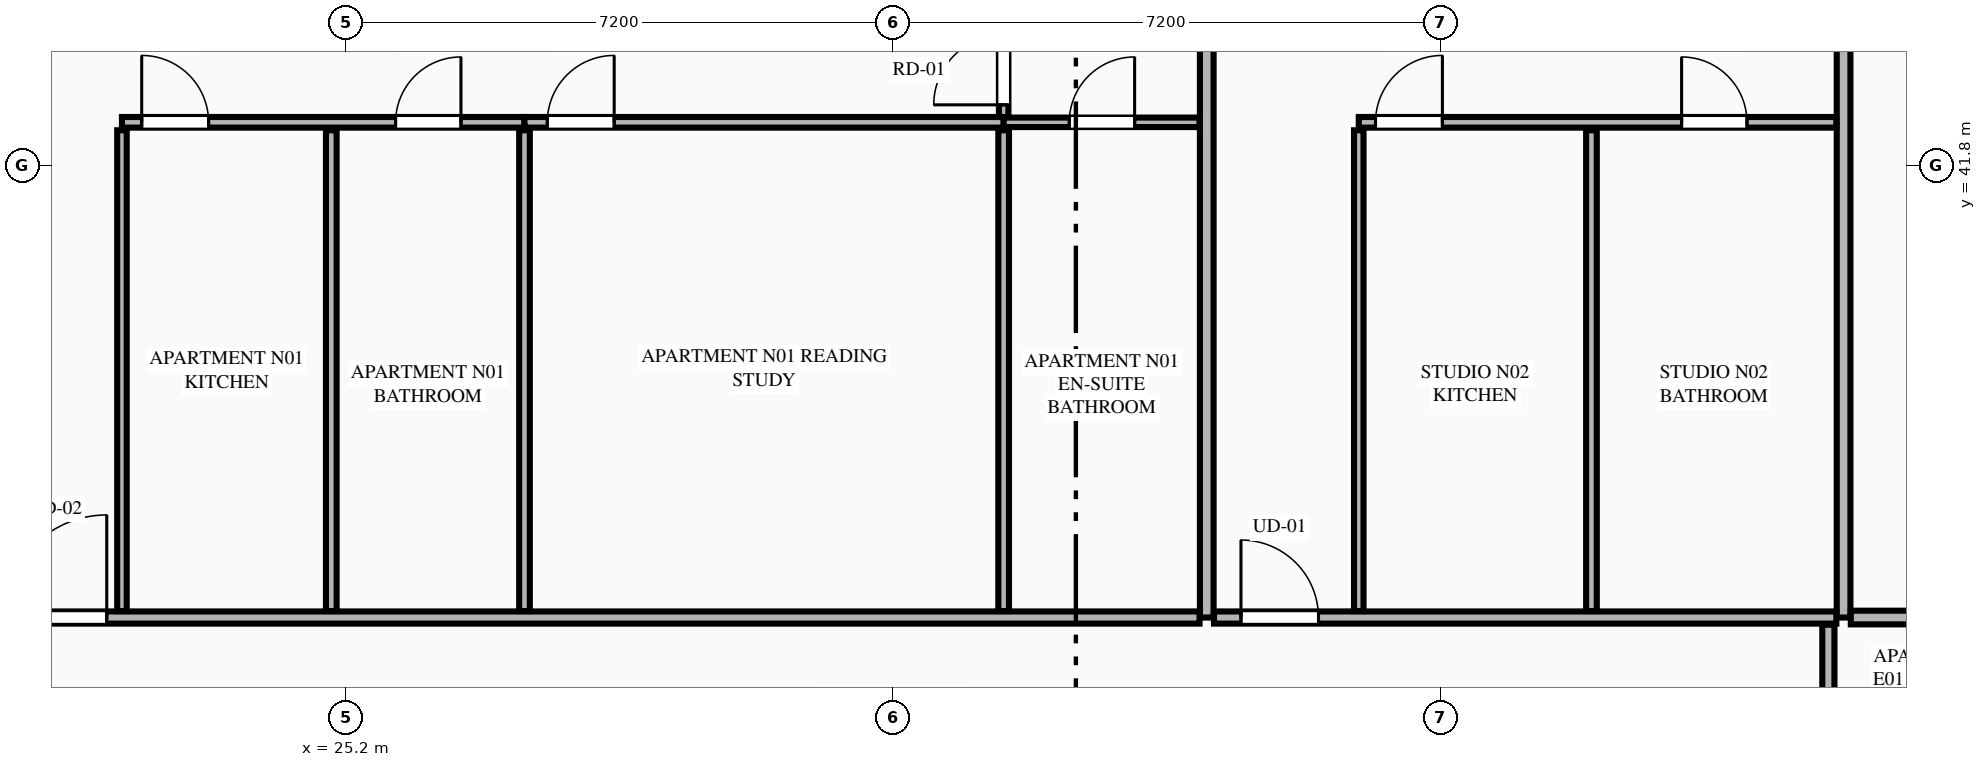
"""IFC4 building model, lengths in metres.
Left out: names, types, materials, properties, quantities, classifications, styles, units other than length and angle.
Written with IfcOpenShell. Run it as: python <this file> out.ifc"""

import sys

from ifc_helpers import new_model, si_unit, direction, frame, frame_2d, origin, place, context, subcontext, project, spatial, rectangle, extrude, element, fill, save


model = new_model("IFC4")
c1 = context("Model", 3, precision=1e-05, world=origin(), true_north=direction((0.0, 1.0)))
c2 = subcontext(c1, "Body", "Model", "MODEL_VIEW")
j1 = project(units=[si_unit("LENGTHUNIT", "METRE"), si_unit("PLANEANGLEUNIT", "RADIAN")], contexts=[c1])
p1 = place(None, origin())
s1 = spatial("IfcSite", under=j1, at=p1, CompositionType="ELEMENT")
p2 = place(p1, origin())
s2 = spatial("IfcBuilding", under=s1, at=p2, CompositionType="ELEMENT")
p3 = place(p2, frame((0.0, 0.0, 53.3)))
s3 = spatial("IfcBuildingStorey", under=s2, at=p3, CompositionType="ELEMENT", Elevation=53.3)
p4 = place(p3, frame((36.522, 35.85, 0.0), z_axis=(0.0, 0.0, 1.0), x_axis=(0.0, 1.0, 0.0)))
e1 = element("IfcWall", 1, at=p4, inside=s3, PredefinedType="PARTITIONING", context=c2, shape_type="SweptSolid", body=[
    extrude(rectangle(XDim=13.295, YDim=0.18, at=frame_2d((6.647, 0.0))), origin(), (0.0, 0.0, 1.0), 2.637),
])
p5 = place(p3, frame((44.9, 35.85, 0.0), z_axis=(0.0, 0.0, 1.0), x_axis=(0.0, 1.0, 0.0)))
e2 = element("IfcWall", 2, at=p5, inside=s3, PredefinedType="PARTITIONING", context=c2, shape_type="SweptSolid", body=[
    extrude(rectangle(XDim=13.295, YDim=0.18, at=frame_2d((6.647, 0.0))), origin(), (0.0, 0.0, 1.0), 3.33),
])
p6 = place(p3, frame((19.995, 35.85, 0.0), z_axis=(0.0, 0.0, 1.0), x_axis=(1.0, 0.0, 0.0)))
e3 = element("IfcWall", 3, at=p6, inside=s3, PredefinedType="PARTITIONING", context=c2, shape_type="SweptSolid", body=[
    extrude(rectangle(XDim=16.432, YDim=0.16, at=frame_2d((8.216, 0.0))), origin(), (0.0, 0.0, 1.0), 3.33),
])
p7 = place(p6, frame((0.705, 0.0, 0.0)))
e4 = element("IfcOpeningElement", 4, at=p7, cuts=e3, PredefinedType="OPENING", context=c2, shape_type="SweptSolid", body=[
    extrude(rectangle(XDim=1.35, YDim=2.35, at=frame_2d((0.675, 1.175))), frame((0.0, 0.09, 0.0), z_axis=(0.0, -1.0, 0.0), x_axis=(1.0, 0.0, 0.0)), (0.0, 0.0, 1.0), 0.18),
])
p8 = place(p3, frame((22.25, 35.935, 0.0), z_axis=(0.0, 0.0, 1.0), x_axis=(0.0, 1.0, 0.0)))
e5 = element("IfcWall", 5, at=p8, inside=s3, PredefinedType="PARTITIONING", context=c2, shape_type="SweptSolid", body=[
    extrude(rectangle(XDim=6.325, YDim=0.125, at=frame_2d((3.163, 0.0))), origin(), (0.0, 0.0, 1.0), 2.637),
])
p9 = place(p3, frame((22.25, 42.365, 0.0), z_axis=(0.0, 0.0, 1.0), x_axis=(1.0, 0.0, 0.0)))
e6 = element("IfcWall", 6, at=p9, inside=s3, PredefinedType="PLUMBINGWALL", context=c2, shape_type="SweptSolid", body=[
    extrude(rectangle(XDim=5.296, YDim=0.14, at=frame_2d((2.648, 0.0))), origin(), (0.0, 0.0, 1.0), 3.33),
])
p10 = place(p9, frame((3.6, 0.0, 0.0)))
e7 = element("IfcOpeningElement", 7, at=p10, cuts=e6, PredefinedType="OPENING", context=c2, shape_type="SweptSolid", body=[
    extrude(rectangle(XDim=0.86, YDim=2.1, at=frame_2d((0.43, 1.05))), frame((0.0, 0.08, 0.0), z_axis=(0.0, -1.0, 0.0), x_axis=(1.0, 0.0, 0.0)), (0.0, 0.0, 1.0), 0.16),
])
p11 = place(p9, frame((0.26, 0.0, 0.0)))
e8 = element("IfcOpeningElement", 8, at=p11, cuts=e6, PredefinedType="OPENING", context=c2, shape_type="SweptSolid", body=[
    extrude(rectangle(XDim=0.88, YDim=2.15, at=frame_2d((0.44, 1.075))), frame((0.0, 0.08, 0.0), z_axis=(0.0, -1.0, 0.0), x_axis=(1.0, 0.0, 0.0)), (0.0, 0.0, 1.0), 0.16),
])
p12 = place(p3, frame((27.546, 42.365, 0.0), z_axis=(0.0, 0.0, 1.0), x_axis=(1.0, 0.0, 0.0)))
e9 = element("IfcWall", 9, at=p12, inside=s3, PredefinedType="PLUMBINGWALL", context=c2, shape_type="SweptSolid", body=[
    extrude(rectangle(XDim=6.304, YDim=0.14, at=frame_2d((3.152, 0.0))), origin(), (0.0, 0.0, 1.0), 3.33),
])
p13 = place(p12, frame((0.3, 0.0, 0.0)))
e10 = element("IfcOpeningElement", 10, at=p13, cuts=e9, PredefinedType="OPENING", context=c2, shape_type="SweptSolid", body=[
    extrude(rectangle(XDim=0.88, YDim=2.15, at=frame_2d((0.44, 1.075))), frame((0.0, 0.08, 0.0), z_axis=(0.0, -1.0, 0.0), x_axis=(1.0, 0.0, 0.0)), (0.0, 0.0, 1.0), 0.16),
])
p14 = place(p3, frame((33.85, 42.365, 0.0), z_axis=(0.0, 0.0, 1.0), x_axis=(1.0, 0.0, 0.0)))
e11 = element("IfcWall", 11, at=p14, inside=s3, PredefinedType="PARTITIONING", context=c2, shape_type="SweptSolid", body=[
    extrude(rectangle(XDim=2.577, YDim=0.125, at=frame_2d((1.289, 0.0))), origin(), (0.0, 0.0, 1.0), 3.33),
])
p15 = place(p14, frame((0.863, 0.0, 0.0)))
e12 = element("IfcOpeningElement", 12, at=p15, cuts=e11, PredefinedType="OPENING", context=c2, shape_type="SweptSolid", body=[
    extrude(rectangle(XDim=0.86, YDim=2.1, at=frame_2d((0.43, 1.05))), frame((0.0, 0.073, 0.0), z_axis=(0.0, -1.0, 0.0), x_axis=(1.0, 0.0, 0.0)), (0.0, 0.0, 1.0), 0.145),
])
p16 = place(p3, frame((25.004, 35.935, 0.0), z_axis=(0.0, 0.0, 1.0), x_axis=(0.0, 1.0, 0.0)))
e13 = element("IfcWall", 13, at=p16, inside=s3, PredefinedType="PLUMBINGWALL", context=c2, shape_type="SweptSolid", body=[
    extrude(rectangle(XDim=6.325, YDim=0.14, at=frame_2d((3.163, 0.0))), origin(), (0.0, 0.0, 1.0), 3.33),
])
p17 = place(p3, frame((33.85, 42.435, 0.0), z_axis=(0.0, 0.0, 1.0), x_axis=(0.0, 1.0, 0.0)))
e14 = element("IfcWall", 14, at=p17, inside=s3, PredefinedType="PARTITIONING", context=c2, shape_type="SweptSolid", body=[
    extrude(rectangle(XDim=1.33, YDim=0.125, at=frame_2d((0.665, 0.0))), origin(), (0.0, 0.0, 1.0), 3.33),
])
p18 = place(p17, frame((0.16, 0.0, 0.0)))
e15 = element("IfcOpeningElement", 15, at=p18, cuts=e14, PredefinedType="OPENING", context=c2, shape_type="SweptSolid", body=[
    extrude(rectangle(XDim=0.92, YDim=2.15, at=frame_2d((0.46, 1.075))), frame((0.0, 0.073, 0.0), z_axis=(0.0, -1.0, 0.0), x_axis=(1.0, 0.0, 0.0)), (0.0, 0.0, 1.0), 0.145),
])
for number, where, z_axis, x_axis in (
    (16, (27.546, 35.935, 0.0), (0.0, 0.0, 1.0), (0.0, 1.0, 0.0)),
    (17, (33.85, 35.935, 0.0), (0.0, 0.0, 1.0), (0.0, 1.0, 0.0)),
):
    element("IfcWall", number, at=place(p3, frame(where, z_axis=z_axis, x_axis=x_axis)), inside=s3, PredefinedType="PLUMBINGWALL", context=c2, shape_type="SweptSolid", body=[
        extrude(rectangle(XDim=6.325, YDim=0.14, at=frame_2d((3.163, 0.0))), origin(), (0.0, 0.0, 1.0), 3.33),
    ])
p19 = place(p3, frame((36.617, 35.85, 0.0), z_axis=(0.0, 0.0, 1.0), x_axis=(1.0, 0.0, 0.0)))
e18 = element("IfcWall", 18, at=p19, inside=s3, PredefinedType="PARTITIONING", context=c2, shape_type="SweptSolid", body=[
    extrude(rectangle(XDim=8.188, YDim=0.16, at=frame_2d((4.094, 0.0))), origin(), (0.0, 0.0, 1.0), 3.33),
])
p20 = place(p19, frame((0.355, 0.0, 0.0)))
e19 = element("IfcOpeningElement", 19, at=p20, cuts=e18, PredefinedType="OPENING", context=c2, shape_type="SweptSolid", body=[
    extrude(rectangle(XDim=1.02, YDim=2.25, at=frame_2d((0.51, 1.125))), frame((0.0, 0.09, 0.0), z_axis=(0.0, -1.0, 0.0), x_axis=(1.0, 0.0, 0.0)), (0.0, 0.0, 1.0), 0.18),
])
p21 = place(p3, frame((38.522, 35.935, 0.0), z_axis=(0.0, 0.0, 1.0), x_axis=(0.0, 1.0, 0.0)))
e20 = element("IfcWall", 20, at=p21, inside=s3, PredefinedType="PARTITIONING", context=c2, shape_type="SweptSolid", body=[
    extrude(rectangle(XDim=6.325, YDim=0.125, at=frame_2d((3.163, 0.0))), origin(), (0.0, 0.0, 1.0), 3.33),
])
p22 = place(p3, frame((38.522, 42.365, 0.0), z_axis=(0.0, 0.0, 1.0), x_axis=(1.0, 0.0, 0.0)))
e21 = element("IfcWall", 21, at=p22, inside=s3, PredefinedType="PLUMBINGWALL", context=c2, shape_type="SweptSolid", body=[
    extrude(rectangle(XDim=6.283, YDim=0.14, at=frame_2d((3.142, 0.0))), origin(), (0.0, 0.0, 1.0), 3.33),
])
p23 = place(p22, frame((4.247, 0.0, 0.0)))
e22 = element("IfcOpeningElement", 22, at=p23, cuts=e21, PredefinedType="OPENING", context=c2, shape_type="SweptSolid", body=[
    extrude(rectangle(XDim=0.86, YDim=2.1, at=frame_2d((0.43, 1.05))), frame((0.0, 0.08, 0.0), z_axis=(0.0, -1.0, 0.0), x_axis=(1.0, 0.0, 0.0)), (0.0, 0.0, 1.0), 0.16),
])
p24 = place(p22, frame((0.22, 0.0, 0.0)))
e23 = element("IfcOpeningElement", 23, at=p24, cuts=e21, PredefinedType="OPENING", context=c2, shape_type="SweptSolid", body=[
    extrude(rectangle(XDim=0.88, YDim=2.15, at=frame_2d((0.44, 1.075))), frame((0.0, 0.08, 0.0), z_axis=(0.0, -1.0, 0.0), x_axis=(1.0, 0.0, 0.0)), (0.0, 0.0, 1.0), 0.16),
])
p25 = place(p3, frame((41.583, 35.935, 0.0), z_axis=(0.0, 0.0, 1.0), x_axis=(0.0, 1.0, 0.0)))
e24 = element("IfcWall", 24, at=p25, inside=s3, PredefinedType="PLUMBINGWALL", context=c2, shape_type="SweptSolid", body=[
    extrude(rectangle(XDim=6.325, YDim=0.14, at=frame_2d((3.163, 0.0))), origin(), (0.0, 0.0, 1.0), 3.33),
])
p26 = place(p3, frame((44.995, 35.85, 0.0), z_axis=(0.0, 0.0, 1.0), x_axis=(1.0, 0.0, 0.0)))
e25 = element("IfcWall", 25, at=p26, inside=s3, PredefinedType="PARTITIONING", context=c2, shape_type="SweptSolid", body=[
    extrude(rectangle(XDim=9.14, YDim=0.18, at=frame_2d((4.57, 0.0))), origin(), (0.0, 0.0, 1.0), 3.33),
])
p27 = place(p3, frame((44.7, 16.045, 0.0), z_axis=(0.0, 0.0, 1.0), x_axis=(0.0, 1.0, 0.0)))
e26 = element("IfcWall", 26, at=p27, inside=s3, PredefinedType="PARTITIONING", context=c2, shape_type="SweptSolid", body=[
    extrude(rectangle(XDim=19.71, YDim=0.16, at=frame_2d((9.855, 0.0))), origin(), (0.0, 0.0, 1.0), 3.33),
])
p28 = place(p27, frame((0.45, 0.0, 0.0)))
e27 = element("IfcOpeningElement", 27, at=p28, cuts=e26, PredefinedType="OPENING", context=c2, shape_type="SweptSolid", body=[
    extrude(rectangle(XDim=1.02, YDim=2.25, at=frame_2d((0.51, 1.125))), frame((0.0, 0.09, 0.0), z_axis=(0.0, -1.0, 0.0), x_axis=(1.0, 0.0, 0.0)), (0.0, 0.0, 1.0), 0.18),
])
p29 = place(p10, origin())
e28 = element("IfcDoor", 28, at=p29, inside=s3, OperationType="SINGLE_SWING_RIGHT", PredefinedType="DOOR", context=c2, shape_type="SweptSolid", body=[
    extrude(rectangle(XDim=0.86, YDim=2.1, at=frame_2d((0.43, 1.05))), frame((0.0, 0.025, 0.0), z_axis=(0.0, -1.0, 0.0), x_axis=(1.0, 0.0, 0.0)), (0.0, 0.0, 1.0), 0.05),
])
fill(e7, e28)
p30 = place(p15, origin())
e29 = element("IfcDoor", 29, at=p30, inside=s3, OperationType="SINGLE_SWING_RIGHT", PredefinedType="DOOR", context=c2, shape_type="SweptSolid", body=[
    extrude(rectangle(XDim=0.86, YDim=2.1, at=frame_2d((0.43, 1.05))), frame((0.0, 0.025, 0.0), z_axis=(0.0, -1.0, 0.0), x_axis=(1.0, 0.0, 0.0)), (0.0, 0.0, 1.0), 0.05),
])
fill(e12, e29)
p31 = place(p7, origin())
e30 = element("IfcDoor", 30, at=p31, inside=s3, OperationType="SINGLE_SWING_RIGHT", PredefinedType="DOOR", context=c2, shape_type="SweptSolid", body=[
    extrude(rectangle(XDim=1.35, YDim=2.35, at=frame_2d((0.675, 1.175))), frame((0.0, 0.025, 0.0), z_axis=(0.0, -1.0, 0.0), x_axis=(1.0, 0.0, 0.0)), (0.0, 0.0, 1.0), 0.05),
])
fill(e4, e30)
p32 = place(p11, origin())
e31 = element("IfcDoor", 31, at=p32, inside=s3, OperationType="SINGLE_SWING_LEFT", PredefinedType="DOOR", context=c2, shape_type="SweptSolid", body=[
    extrude(rectangle(XDim=0.88, YDim=2.15, at=frame_2d((0.44, 1.075))), frame((0.0, 0.025, 0.0), z_axis=(0.0, -1.0, 0.0), x_axis=(1.0, 0.0, 0.0)), (0.0, 0.0, 1.0), 0.05),
])
fill(e8, e31)
p33 = place(p13, origin())
e32 = element("IfcDoor", 32, at=p33, inside=s3, OperationType="SINGLE_SWING_RIGHT", PredefinedType="DOOR", context=c2, shape_type="SweptSolid", body=[
    extrude(rectangle(XDim=0.88, YDim=2.15, at=frame_2d((0.44, 1.075))), frame((0.0, 0.025, 0.0), z_axis=(0.0, -1.0, 0.0), x_axis=(1.0, 0.0, 0.0)), (0.0, 0.0, 1.0), 0.05),
])
fill(e10, e32)
p34 = place(p18, origin())
e33 = element("IfcDoor", 33, at=p34, inside=s3, OperationType="SINGLE_SWING_LEFT", PredefinedType="DOOR", context=c2, shape_type="SweptSolid", body=[
    extrude(rectangle(XDim=0.92, YDim=2.15, at=frame_2d((0.46, 1.075))), frame((0.0, 0.025, 0.0), z_axis=(0.0, -1.0, 0.0), x_axis=(1.0, 0.0, 0.0)), (0.0, 0.0, 1.0), 0.05),
])
fill(e15, e33)
p35 = place(p23, origin())
e34 = element("IfcDoor", 34, at=p35, inside=s3, OperationType="SINGLE_SWING_LEFT", PredefinedType="DOOR", context=c2, shape_type="SweptSolid", body=[
    extrude(rectangle(XDim=0.86, YDim=2.1, at=frame_2d((0.43, 1.05))), frame((0.0, 0.025, 0.0), z_axis=(0.0, -1.0, 0.0), x_axis=(1.0, 0.0, 0.0)), (0.0, 0.0, 1.0), 0.05),
])
fill(e22, e34)
p36 = place(p20, origin())
e35 = element("IfcDoor", 35, at=p36, inside=s3, OperationType="SINGLE_SWING_LEFT", PredefinedType="DOOR", context=c2, shape_type="SweptSolid", body=[
    extrude(rectangle(XDim=1.02, YDim=2.25, at=frame_2d((0.51, 1.125))), frame((0.0, 0.025, 0.0), z_axis=(0.0, -1.0, 0.0), x_axis=(1.0, 0.0, 0.0)), (0.0, 0.0, 1.0), 0.05),
])
fill(e19, e35)
p37 = place(p24, origin())
e36 = element("IfcDoor", 36, at=p37, inside=s3, OperationType="SINGLE_SWING_RIGHT", PredefinedType="DOOR", context=c2, shape_type="SweptSolid", body=[
    extrude(rectangle(XDim=0.88, YDim=2.15, at=frame_2d((0.44, 1.075))), frame((0.0, 0.025, 0.0), z_axis=(0.0, -1.0, 0.0), x_axis=(1.0, 0.0, 0.0)), (0.0, 0.0, 1.0), 0.05),
])
fill(e23, e36)
save(model, sys.argv[1])
